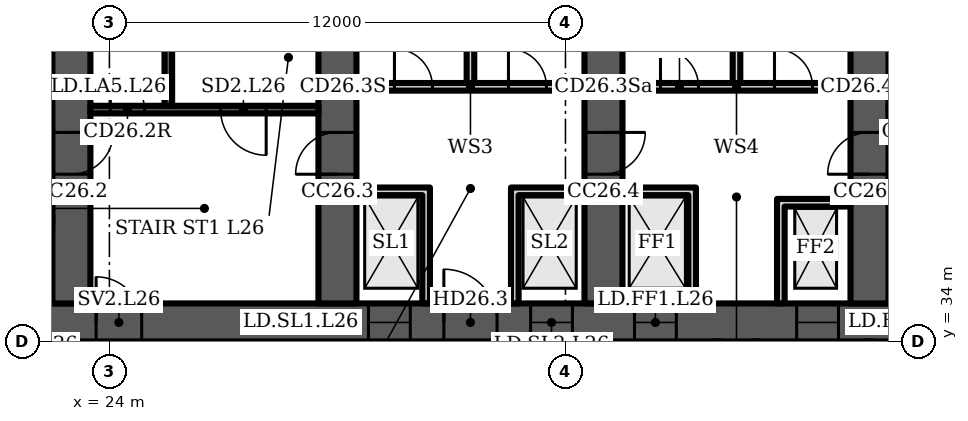
"""IFC4 building model, lengths in metres.
Left out: names, types, materials, properties, quantities, classifications, styles, units other than length and angle.
Written with IfcOpenShell. Run it as: python <this file> out.ifc"""

import sys

from ifc_helpers import new_model, si_unit, direction, frame, frame_2d, origin, place, context, subcontext, project, spatial, polyline, rectangle, outline, extrude, element, fill, save


model = new_model("IFC4")
c1 = context("Model", 3, precision=1e-05, world=origin(), true_north=direction((0.0, 1.0)))
c2 = subcontext(c1, "Body", "Model", "MODEL_VIEW")
j1 = project(units=[si_unit("LENGTHUNIT", "METRE"), si_unit("PLANEANGLEUNIT", "RADIAN")], contexts=[c1])
p1 = place(None, origin())
s1 = spatial("IfcSite", under=j1, at=p1, CompositionType="ELEMENT")
p2 = place(p1, origin())
s2 = spatial("IfcBuilding", under=s1, at=p2, CompositionType="ELEMENT")
p3 = place(p2, frame((0.0, 0.0, 114.7)))
s3 = spatial("IfcBuildingStorey", under=s2, at=p3, CompositionType="ELEMENT", Elevation=114.7)
p4 = place(p3, frame((16.0, 34.5, 0.0), z_axis=(0.0, 0.0, 1.0), x_axis=(1.0, 0.0, 0.0)))
e1 = element("IfcWall", 1, at=p4, inside=s3, PredefinedType="SHEAR", context=c2, shape_type="SweptSolid", body=[
    extrude(rectangle(XDim=49.0, YDim=1.0, at=frame_2d((24.5, 0.0))), origin(), (0.0, 0.0, 1.0), 3.6),
])
p5 = place(p4, frame((1.2, 0.0, 0.0)))
e2 = element("IfcOpeningElement", 2, at=p5, cuts=e1, PredefinedType="OPENING", context=c2, shape_type="SweptSolid", body=[
    extrude(rectangle(XDim=1.1, YDim=2.1, at=frame_2d((0.55, 1.05))), frame((0.0, 0.51, 0.0), z_axis=(0.0, -1.0, 0.0), x_axis=(1.0, 0.0, 0.0)), (0.0, 0.0, 1.0), 1.02),
])
p6 = place(p4, frame((5.083, 0.0, 0.0)))
e3 = element("IfcOpeningElement", 3, at=p6, cuts=e1, PredefinedType="OPENING", context=c2, shape_type="SweptSolid", body=[
    extrude(rectangle(XDim=1.1, YDim=2.1, at=frame_2d((0.55, 1.05))), frame((0.0, 0.51, 0.0), z_axis=(0.0, -1.0, 0.0), x_axis=(1.0, 0.0, 0.0)), (0.0, 0.0, 1.0), 1.02),
])
p7 = place(p4, frame((2.933, 0.0, 0.0)))
e4 = element("IfcOpeningElement", 4, at=p7, cuts=e1, PredefinedType="OPENING", context=c2, shape_type="SweptSolid", body=[
    extrude(rectangle(XDim=1.4, YDim=2.1, at=frame_2d((0.7, 1.05))), frame((0.0, 0.51, 0.0), z_axis=(0.0, -1.0, 0.0), x_axis=(1.0, 0.0, 0.0)), (0.0, 0.0, 1.0), 1.02),
])
p8 = place(p4, frame((7.65, 0.0, 0.0)))
e5 = element("IfcOpeningElement", 5, at=p8, cuts=e1, PredefinedType="OPENING", context=c2, shape_type="SweptSolid", body=[
    extrude(rectangle(XDim=1.2, YDim=2.1, at=frame_2d((0.6, 1.05))), frame((0.0, 0.51, 0.0), z_axis=(0.0, -1.0, 0.0), x_axis=(1.0, 0.0, 0.0)), (0.0, 0.0, 1.0), 1.02),
])
p9 = place(p4, frame((14.817, 0.0, 0.0)))
e6 = element("IfcOpeningElement", 6, at=p9, cuts=e1, PredefinedType="OPENING", context=c2, shape_type="SweptSolid", body=[
    extrude(rectangle(XDim=1.1, YDim=2.1, at=frame_2d((0.55, 1.05))), frame((0.0, 0.51, 0.0), z_axis=(0.0, -1.0, 0.0), x_axis=(1.0, 0.0, 0.0)), (0.0, 0.0, 1.0), 1.02),
])
p10 = place(p4, frame((19.083, 0.0, 0.0)))
e7 = element("IfcOpeningElement", 7, at=p10, cuts=e1, PredefinedType="OPENING", context=c2, shape_type="SweptSolid", body=[
    extrude(rectangle(XDim=1.1, YDim=2.1, at=frame_2d((0.55, 1.05))), frame((0.0, 0.51, 0.0), z_axis=(0.0, -1.0, 0.0), x_axis=(1.0, 0.0, 0.0)), (0.0, 0.0, 1.0), 1.02),
])
p11 = place(p4, frame((16.8, 0.0, 0.0)))
e8 = element("IfcOpeningElement", 8, at=p11, cuts=e1, PredefinedType="OPENING", context=c2, shape_type="SweptSolid", body=[
    extrude(rectangle(XDim=1.4, YDim=2.1, at=frame_2d((0.7, 1.05))), frame((0.0, 0.51, 0.0), z_axis=(0.0, -1.0, 0.0), x_axis=(1.0, 0.0, 0.0)), (0.0, 0.0, 1.0), 1.02),
])
p12 = place(p4, frame((21.817, 0.0, 0.0)))
e9 = element("IfcOpeningElement", 9, at=p12, cuts=e1, PredefinedType="OPENING", context=c2, shape_type="SweptSolid", body=[
    extrude(rectangle(XDim=1.1, YDim=2.1, at=frame_2d((0.55, 1.05))), frame((0.0, 0.51, 0.0), z_axis=(0.0, -1.0, 0.0), x_axis=(1.0, 0.0, 0.0)), (0.0, 0.0, 1.0), 1.02),
])
p13 = place(p4, frame((26.083, 0.0, 0.0)))
e10 = element("IfcOpeningElement", 10, at=p13, cuts=e1, PredefinedType="OPENING", context=c2, shape_type="SweptSolid", body=[
    extrude(rectangle(XDim=1.1, YDim=2.1, at=frame_2d((0.55, 1.05))), frame((0.0, 0.51, 0.0), z_axis=(0.0, -1.0, 0.0), x_axis=(1.0, 0.0, 0.0)), (0.0, 0.0, 1.0), 1.02),
])
p14 = place(p4, frame((33.15, 0.0, 0.0)))
e11 = element("IfcOpeningElement", 11, at=p14, cuts=e1, PredefinedType="OPENING", context=c2, shape_type="SweptSolid", body=[
    extrude(rectangle(XDim=1.2, YDim=2.1, at=frame_2d((0.6, 1.05))), frame((0.0, 0.51, 0.0), z_axis=(0.0, -1.0, 0.0), x_axis=(1.0, 0.0, 0.0)), (0.0, 0.0, 1.0), 1.02),
])
p15 = place(p4, frame((37.8, 0.0, 0.0)))
e12 = element("IfcOpeningElement", 12, at=p15, cuts=e1, PredefinedType="OPENING", context=c2, shape_type="SweptSolid", body=[
    extrude(rectangle(XDim=1.4, YDim=2.1, at=frame_2d((0.7, 1.05))), frame((0.0, 0.51, 0.0), z_axis=(0.0, -1.0, 0.0), x_axis=(1.0, 0.0, 0.0)), (0.0, 0.0, 1.0), 1.02),
])
p16 = place(p4, frame((42.817, 0.0, 0.0)))
e13 = element("IfcOpeningElement", 13, at=p16, cuts=e1, PredefinedType="OPENING", context=c2, shape_type="SweptSolid", body=[
    extrude(rectangle(XDim=1.1, YDim=2.1, at=frame_2d((0.55, 1.05))), frame((0.0, 0.51, 0.0), z_axis=(0.0, -1.0, 0.0), x_axis=(1.0, 0.0, 0.0)), (0.0, 0.0, 1.0), 1.02),
])
p17 = place(p4, frame((46.7, 0.0, 0.0)))
e14 = element("IfcOpeningElement", 14, at=p17, cuts=e1, PredefinedType="OPENING", context=c2, shape_type="SweptSolid", body=[
    extrude(rectangle(XDim=1.1, YDim=2.1, at=frame_2d((0.55, 1.05))), frame((0.0, 0.51, 0.0), z_axis=(0.0, -1.0, 0.0), x_axis=(1.0, 0.0, 0.0)), (0.0, 0.0, 1.0), 1.02),
])
p18 = place(p4, frame((44.667, 0.0, 0.0)))
e15 = element("IfcOpeningElement", 15, at=p18, cuts=e1, PredefinedType="OPENING", context=c2, shape_type="SweptSolid", body=[
    extrude(rectangle(XDim=1.4, YDim=2.1, at=frame_2d((0.7, 1.05))), frame((0.0, 0.51, 0.0), z_axis=(0.0, -1.0, 0.0), x_axis=(1.0, 0.0, 0.0)), (0.0, 0.0, 1.0), 1.02),
])
p19 = place(p3, frame((23.0, 35.0, 0.0), z_axis=(0.0, 0.0, 1.0), x_axis=(0.0, 1.0, 0.0)))
e16 = element("IfcWall", 16, at=p19, inside=s3, PredefinedType="SHEAR", context=c2, shape_type="SweptSolid", body=[
    extrude(rectangle(XDim=13.352, YDim=1.0, at=frame_2d((6.676, 0.0))), origin(), (0.0, 0.0, 1.0), 3.6),
])
p20 = place(p19, frame((10.426, 0.0, 0.0)))
e17 = element("IfcOpeningElement", 17, at=p20, cuts=e16, PredefinedType="OPENING", context=c2, shape_type="SweptSolid", body=[
    extrude(rectangle(XDim=1.0, YDim=2.1, at=frame_2d((0.5, 1.05))), frame((0.0, 0.51, 0.0), z_axis=(0.0, -1.0, 0.0), x_axis=(1.0, 0.0, 0.0)), (0.0, 0.0, 1.0), 1.02),
])
p21 = place(p19, frame((3.4, 0.0, 0.0)))
e18 = element("IfcOpeningElement", 18, at=p21, cuts=e16, PredefinedType="OPENING", context=c2, shape_type="SweptSolid", body=[
    extrude(rectangle(XDim=1.1, YDim=2.1, at=frame_2d((0.55, 1.05))), frame((0.0, 0.51, 0.0), z_axis=(0.0, -1.0, 0.0), x_axis=(1.0, 0.0, 0.0)), (0.0, 0.0, 1.0), 1.02),
])
p22 = place(p3, frame((30.0, 35.0, 0.0), z_axis=(0.0, 0.0, 1.0), x_axis=(0.0, 1.0, 0.0)))
e19 = element("IfcWall", 19, at=p22, inside=s3, PredefinedType="SHEAR", context=c2, shape_type="SweptSolid", body=[
    extrude(rectangle(XDim=13.965, YDim=1.0, at=frame_2d((6.982, 0.0))), origin(), (0.0, 0.0, 1.0), 3.6),
])
p23 = place(p22, frame((3.4, 0.0, 0.0)))
e20 = element("IfcOpeningElement", 20, at=p23, cuts=e19, PredefinedType="OPENING", context=c2, shape_type="SweptSolid", body=[
    extrude(rectangle(XDim=1.1, YDim=2.1, at=frame_2d((0.55, 1.05))), frame((0.0, 0.51, 0.0), z_axis=(0.0, -1.0, 0.0), x_axis=(1.0, 0.0, 0.0)), (0.0, 0.0, 1.0), 1.02),
])
p24 = place(p3, frame((37.0, 35.0, 0.0), z_axis=(0.0, 0.0, 1.0), x_axis=(0.0, 1.0, 0.0)))
e21 = element("IfcWall", 21, at=p24, inside=s3, PredefinedType="SHEAR", context=c2, shape_type="SweptSolid", body=[
    extrude(rectangle(XDim=14.577, YDim=1.0, at=frame_2d((7.289, 0.0))), origin(), (0.0, 0.0, 1.0), 3.6),
])
p25 = place(p24, frame((3.4, 0.0, 0.0)))
e22 = element("IfcOpeningElement", 22, at=p25, cuts=e21, PredefinedType="OPENING", context=c2, shape_type="SweptSolid", body=[
    extrude(rectangle(XDim=1.1, YDim=2.1, at=frame_2d((0.55, 1.05))), frame((0.0, 0.51, 0.0), z_axis=(0.0, -1.0, 0.0), x_axis=(1.0, 0.0, 0.0)), (0.0, 0.0, 1.0), 1.02),
])
p26 = place(p24, frame((9.8, 0.0, 0.0)))
e23 = element("IfcOpeningElement", 23, at=p26, cuts=e21, PredefinedType="OPENING", context=c2, shape_type="SweptSolid", body=[
    extrude(rectangle(XDim=1.0, YDim=2.1, at=frame_2d((0.5, 1.05))), frame((0.0, 0.51, 0.0), z_axis=(0.0, -1.0, 0.0), x_axis=(1.0, 0.0, 0.0)), (0.0, 0.0, 1.0), 1.02),
])
p27 = place(p3, frame((44.0, 35.0, 0.0), z_axis=(0.0, 0.0, 1.0), x_axis=(0.0, 1.0, 0.0)))
e24 = element("IfcWall", 24, at=p27, inside=s3, PredefinedType="SHEAR", context=c2, shape_type="SweptSolid", body=[
    extrude(rectangle(XDim=14.577, YDim=1.0, at=frame_2d((7.289, 0.0))), origin(), (0.0, 0.0, 1.0), 3.6),
])
p28 = place(p27, frame((3.4, 0.0, 0.0)))
e25 = element("IfcOpeningElement", 25, at=p28, cuts=e24, PredefinedType="OPENING", context=c2, shape_type="SweptSolid", body=[
    extrude(rectangle(XDim=1.1, YDim=2.1, at=frame_2d((0.55, 1.05))), frame((0.0, 0.51, 0.0), z_axis=(0.0, -1.0, 0.0), x_axis=(1.0, 0.0, 0.0)), (0.0, 0.0, 1.0), 1.02),
])
p29 = place(p27, frame((9.8, 0.0, 0.0)))
e26 = element("IfcOpeningElement", 26, at=p29, cuts=e24, PredefinedType="OPENING", context=c2, shape_type="SweptSolid", body=[
    extrude(rectangle(XDim=1.0, YDim=2.1, at=frame_2d((0.5, 1.05))), frame((0.0, 0.51, 0.0), z_axis=(0.0, -1.0, 0.0), x_axis=(1.0, 0.0, 0.0)), (0.0, 0.0, 1.0), 1.02),
])
p30 = place(p3, frame((23.5, 40.1, 0.0), z_axis=(0.0, 0.0, 1.0), x_axis=(1.0, 0.0, 0.0)))
e27 = element("IfcWall", 27, at=p30, inside=s3, PredefinedType="SHEAR", context=c2, shape_type="SweptSolid", body=[
    extrude(rectangle(XDim=6.0, YDim=0.2, at=frame_2d((3.0, 0.0))), origin(), (0.0, 0.0, 1.0), 3.2),
])
p31 = place(p30, frame((3.425, 0.0, 0.0)))
e28 = element("IfcOpeningElement", 28, at=p31, cuts=e27, PredefinedType="OPENING", context=c2, shape_type="SweptSolid", body=[
    extrude(rectangle(XDim=1.2, YDim=2.1, at=frame_2d((0.6, 1.05))), frame((0.0, 0.11, 0.0), z_axis=(0.0, -1.0, 0.0), x_axis=(1.0, 0.0, 0.0)), (0.0, 0.0, 1.0), 0.22),
])
p32 = place(p30, frame((0.525, 0.0, 0.0)))
e29 = element("IfcOpeningElement", 29, at=p32, cuts=e27, PredefinedType="OPENING", context=c2, shape_type="SweptSolid", body=[
    extrude(rectangle(XDim=0.9, YDim=2.1, at=frame_2d((0.45, 1.05))), frame((0.0, 0.11, 0.0), z_axis=(0.0, -1.0, 0.0), x_axis=(1.0, 0.0, 0.0)), (0.0, 0.0, 1.0), 0.22),
])
p33 = place(p3, frame((25.55, 40.2, 0.0), z_axis=(0.0, 0.0, 1.0), x_axis=(0.0, 1.0, 0.0)))
e30 = element("IfcWall", 30, at=p33, inside=s3, PredefinedType="SHEAR", context=c2, shape_type="SweptSolid", body=[
    extrude(rectangle(XDim=7.2, YDim=0.2, at=frame_2d((3.6, 0.0))), origin(), (0.0, 0.0, 1.0), 3.2),
])
p34 = place(p3, frame((30.5, 40.7, 0.0), z_axis=(0.0, 0.0, 1.0), x_axis=(1.0, 0.0, 0.0)))
e31 = element("IfcWall", 31, at=p34, inside=s3, PredefinedType="PARTITIONING", context=c2, shape_type="SweptSolid", body=[
    extrude(rectangle(XDim=6.0, YDim=0.2, at=frame_2d((3.0, 0.0))), origin(), (0.0, 0.0, 1.0), 3.2),
])
p35 = place(p34, frame((1.0, 0.0, 0.0)))
e32 = element("IfcOpeningElement", 32, at=p35, cuts=e31, PredefinedType="OPENING", context=c2, shape_type="SweptSolid", body=[
    extrude(rectangle(XDim=1.0, YDim=2.1, at=frame_2d((0.5, 1.05))), frame((0.0, 0.11, 0.0), z_axis=(0.0, -1.0, 0.0), x_axis=(1.0, 0.0, 0.0)), (0.0, 0.0, 1.0), 0.22),
])
p36 = place(p34, frame((4.0, 0.0, 0.0)))
e33 = element("IfcOpeningElement", 33, at=p36, cuts=e31, PredefinedType="OPENING", context=c2, shape_type="SweptSolid", body=[
    extrude(rectangle(XDim=1.0, YDim=2.1, at=frame_2d((0.5, 1.05))), frame((0.0, 0.11, 0.0), z_axis=(0.0, -1.0, 0.0), x_axis=(1.0, 0.0, 0.0)), (0.0, 0.0, 1.0), 0.22),
])
p37 = place(p3, frame((0.0, 0.0, -0.0)))
e34 = element("IfcWall", 34, at=p37, inside=s3, PredefinedType="PARTITIONING", context=c2, shape_type="SweptSolid", body=[
    extrude(outline(polyline([(32.233, 37.85), (30.5, 37.85), (30.5, 38.05), (32.233, 38.05), (32.433, 38.05), (32.433, 35.0), (32.233, 35.0), (32.233, 37.85)])), origin(), (0.0, 0.0, 1.0), 3.2),
])
p38 = place(p3, frame((0.0, 0.0, -0.0)))
e35 = element("IfcWall", 35, at=p38, inside=s3, PredefinedType="PARTITIONING", context=c2, shape_type="SweptSolid", body=[
    extrude(outline(polyline([(34.567, 38.05), (34.767, 38.05), (36.5, 38.05), (36.5, 37.85), (34.767, 37.85), (34.767, 35.0), (34.567, 35.0), (34.567, 38.05)])), origin(), (0.0, 0.0, 1.0), 3.2),
])
p39 = place(p3, frame((33.5, 40.8, 0.0), z_axis=(0.0, 0.0, 1.0), x_axis=(0.0, 1.0, 0.0)))
e36 = element("IfcWall", 36, at=p39, inside=s3, PredefinedType="PARTITIONING", context=c2, shape_type="SweptSolid", body=[
    extrude(rectangle(XDim=8.232, YDim=0.2, at=frame_2d((4.116, 0.0))), origin(), (0.0, 0.0, 1.0), 3.2),
])
p40 = place(p3, frame((37.5, 40.7, 0.0), z_axis=(0.0, 0.0, 1.0), x_axis=(1.0, 0.0, 0.0)))
e37 = element("IfcWall", 37, at=p40, inside=s3, PredefinedType="PARTITIONING", context=c2, shape_type="SweptSolid", body=[
    extrude(rectangle(XDim=6.0, YDim=0.2, at=frame_2d((3.0, 0.0))), origin(), (0.0, 0.0, 1.0), 3.2),
])
p41 = place(p40, frame((1.0, 0.0, 0.0)))
e38 = element("IfcOpeningElement", 38, at=p41, cuts=e37, PredefinedType="OPENING", context=c2, shape_type="SweptSolid", body=[
    extrude(rectangle(XDim=1.0, YDim=2.1, at=frame_2d((0.5, 1.05))), frame((0.0, 0.11, 0.0), z_axis=(0.0, -1.0, 0.0), x_axis=(1.0, 0.0, 0.0)), (0.0, 0.0, 1.0), 0.22),
])
p42 = place(p40, frame((4.0, 0.0, 0.0)))
e39 = element("IfcOpeningElement", 39, at=p42, cuts=e37, PredefinedType="OPENING", context=c2, shape_type="SweptSolid", body=[
    extrude(rectangle(XDim=1.0, YDim=2.1, at=frame_2d((0.5, 1.05))), frame((0.0, 0.11, 0.0), z_axis=(0.0, -1.0, 0.0), x_axis=(1.0, 0.0, 0.0)), (0.0, 0.0, 1.0), 0.22),
])
p43 = place(p3, frame((0.0, 0.0, -0.0)))
e40 = element("IfcWall", 40, at=p43, inside=s3, PredefinedType="PARTITIONING", context=c2, shape_type="SweptSolid", body=[
    extrude(outline(polyline([(41.567, 37.75), (41.767, 37.75), (43.5, 37.75), (43.5, 37.55), (41.767, 37.55), (41.767, 35.0), (41.567, 35.0), (41.567, 37.75)])), origin(), (0.0, 0.0, 1.0), 3.2),
])
p44 = place(p3, frame((0.0, 0.0, -0.0)))
e41 = element("IfcWall", 41, at=p44, inside=s3, PredefinedType="PARTITIONING", context=c2, shape_type="SweptSolid", body=[
    extrude(outline(polyline([(39.233, 37.85), (37.5, 37.85), (37.5, 38.05), (39.233, 38.05), (39.433, 38.05), (39.433, 35.0), (39.233, 35.0), (39.233, 37.85)])), origin(), (0.0, 0.0, 1.0), 3.2),
])
p45 = place(p3, frame((40.5, 40.8, 0.0), z_axis=(0.0, 0.0, 1.0), x_axis=(0.0, 1.0, 0.0)))
e42 = element("IfcWall", 42, at=p45, inside=s3, PredefinedType="PARTITIONING", context=c2, shape_type="SweptSolid", body=[
    extrude(rectangle(XDim=8.844, YDim=0.2, at=frame_2d((4.422, 0.0))), origin(), (0.0, 0.0, 1.0), 3.2),
])
p46 = place(p31, origin())
e43 = element("IfcDoor", 43, at=p46, inside=s3, OperationType="SINGLE_SWING_RIGHT", PredefinedType="DOOR", context=c2, shape_type="SweptSolid", body=[
    extrude(rectangle(XDim=1.2, YDim=2.1, at=frame_2d((0.6, 1.05))), frame((0.0, 0.025, 0.0), z_axis=(0.0, -1.0, 0.0), x_axis=(1.0, 0.0, 0.0)), (0.0, 0.0, 1.0), 0.05),
])
fill(e28, e43)
p47 = place(p32, origin())
e44 = element("IfcDoor", 44, at=p47, inside=s3, OperationType="SINGLE_SWING_LEFT", PredefinedType="DOOR", context=c2, shape_type="SweptSolid", body=[
    extrude(rectangle(XDim=0.9, YDim=2.1, at=frame_2d((0.45, 1.05))), frame((0.0, 0.025, 0.0), z_axis=(0.0, -1.0, 0.0), x_axis=(1.0, 0.0, 0.0)), (0.0, 0.0, 1.0), 0.05),
])
fill(e29, e44)
p48 = place(p8, origin())
e45 = element("IfcDoor", 45, at=p48, inside=s3, OperationType="SINGLE_SWING_LEFT", PredefinedType="DOOR", context=c2, shape_type="SweptSolid", body=[
    extrude(rectangle(XDim=1.2, YDim=2.1, at=frame_2d((0.6, 1.05))), frame((0.0, 0.025, 0.0), z_axis=(0.0, -1.0, 0.0), x_axis=(1.0, 0.0, 0.0)), (0.0, 0.0, 1.0), 0.05),
])
fill(e5, e45)
p49 = place(p9, origin())
e46 = element("IfcDoor", 46, at=p49, inside=s3, OperationType="DOUBLE_DOOR_SLIDING", PredefinedType="DOOR", context=c2, shape_type="SweptSolid", body=[
    extrude(rectangle(XDim=1.1, YDim=2.1, at=frame_2d((0.55, 1.05))), frame((0.0, 0.025, 0.0), z_axis=(0.0, -1.0, 0.0), x_axis=(1.0, 0.0, 0.0)), (0.0, 0.0, 1.0), 0.05),
])
fill(e6, e46)
p50 = place(p10, origin())
e47 = element("IfcDoor", 47, at=p50, inside=s3, OperationType="DOUBLE_DOOR_SLIDING", PredefinedType="DOOR", context=c2, shape_type="SweptSolid", body=[
    extrude(rectangle(XDim=1.1, YDim=2.1, at=frame_2d((0.55, 1.05))), frame((0.0, 0.025, 0.0), z_axis=(0.0, -1.0, 0.0), x_axis=(1.0, 0.0, 0.0)), (0.0, 0.0, 1.0), 0.05),
])
fill(e7, e47)
p51 = place(p11, origin())
e48 = element("IfcDoor", 48, at=p51, inside=s3, OperationType="DOUBLE_DOOR_SINGLE_SWING", PredefinedType="DOOR", context=c2, shape_type="SweptSolid", body=[
    extrude(rectangle(XDim=1.4, YDim=2.1, at=frame_2d((0.7, 1.05))), frame((0.0, 0.025, 0.0), z_axis=(0.0, -1.0, 0.0), x_axis=(1.0, 0.0, 0.0)), (0.0, 0.0, 1.0), 0.05),
])
fill(e8, e48)
p52 = place(p35, origin())
e49 = element("IfcDoor", 49, at=p52, inside=s3, OperationType="SINGLE_SWING_LEFT", PredefinedType="DOOR", context=c2, shape_type="SweptSolid", body=[
    extrude(rectangle(XDim=1.0, YDim=2.1, at=frame_2d((0.5, 1.05))), frame((0.0, 0.025, 0.0), z_axis=(0.0, -1.0, 0.0), x_axis=(1.0, 0.0, 0.0)), (0.0, 0.0, 1.0), 0.05),
])
fill(e32, e49)
p53 = place(p36, origin())
e50 = element("IfcDoor", 50, at=p53, inside=s3, OperationType="SINGLE_SWING_LEFT", PredefinedType="DOOR", context=c2, shape_type="SweptSolid", body=[
    extrude(rectangle(XDim=1.0, YDim=2.1, at=frame_2d((0.5, 1.05))), frame((0.0, 0.025, 0.0), z_axis=(0.0, -1.0, 0.0), x_axis=(1.0, 0.0, 0.0)), (0.0, 0.0, 1.0), 0.05),
])
fill(e33, e50)
p54 = place(p12, origin())
e51 = element("IfcDoor", 51, at=p54, inside=s3, OperationType="DOUBLE_DOOR_SLIDING", PredefinedType="DOOR", context=c2, shape_type="SweptSolid", body=[
    extrude(rectangle(XDim=1.1, YDim=2.1, at=frame_2d((0.55, 1.05))), frame((0.0, 0.025, 0.0), z_axis=(0.0, -1.0, 0.0), x_axis=(1.0, 0.0, 0.0)), (0.0, 0.0, 1.0), 0.05),
])
fill(e9, e51)
p55 = place(p13, origin())
e52 = element("IfcDoor", 52, at=p55, inside=s3, OperationType="DOUBLE_DOOR_SLIDING", PredefinedType="DOOR", context=c2, shape_type="SweptSolid", body=[
    extrude(rectangle(XDim=1.1, YDim=2.1, at=frame_2d((0.55, 1.05))), frame((0.0, 0.025, 0.0), z_axis=(0.0, -1.0, 0.0), x_axis=(1.0, 0.0, 0.0)), (0.0, 0.0, 1.0), 0.05),
])
fill(e10, e52)
p56 = place(p41, origin())
e53 = element("IfcDoor", 53, at=p56, inside=s3, OperationType="SINGLE_SWING_LEFT", PredefinedType="DOOR", context=c2, shape_type="SweptSolid", body=[
    extrude(rectangle(XDim=1.0, YDim=2.1, at=frame_2d((0.5, 1.05))), frame((0.0, 0.025, 0.0), z_axis=(0.0, -1.0, 0.0), x_axis=(1.0, 0.0, 0.0)), (0.0, 0.0, 1.0), 0.05),
])
fill(e38, e53)
p57 = place(p42, origin())
e54 = element("IfcDoor", 54, at=p57, inside=s3, OperationType="SINGLE_SWING_LEFT", PredefinedType="DOOR", context=c2, shape_type="SweptSolid", body=[
    extrude(rectangle(XDim=1.0, YDim=2.1, at=frame_2d((0.5, 1.05))), frame((0.0, 0.025, 0.0), z_axis=(0.0, -1.0, 0.0), x_axis=(1.0, 0.0, 0.0)), (0.0, 0.0, 1.0), 0.05),
])
fill(e39, e54)
p58 = place(p21, origin())
e55 = element("IfcDoor", 55, at=p58, inside=s3, OperationType="SINGLE_SWING_RIGHT", PredefinedType="DOOR", context=c2, shape_type="SweptSolid", body=[
    extrude(rectangle(XDim=1.1, YDim=2.1, at=frame_2d((0.55, 1.05))), frame((0.0, 0.025, 0.0), z_axis=(0.0, -1.0, 0.0), x_axis=(1.0, 0.0, 0.0)), (0.0, 0.0, 1.0), 0.05),
])
fill(e18, e55)
p59 = place(p23, origin())
e56 = element("IfcDoor", 56, at=p59, inside=s3, OperationType="SINGLE_SWING_LEFT", PredefinedType="DOOR", context=c2, shape_type="SweptSolid", body=[
    extrude(rectangle(XDim=1.1, YDim=2.1, at=frame_2d((0.55, 1.05))), frame((0.0, 0.025, 0.0), z_axis=(0.0, -1.0, 0.0), x_axis=(1.0, 0.0, 0.0)), (0.0, 0.0, 1.0), 0.05),
])
fill(e20, e56)
p60 = place(p25, origin())
e57 = element("IfcDoor", 57, at=p60, inside=s3, OperationType="SINGLE_SWING_RIGHT", PredefinedType="DOOR", context=c2, shape_type="SweptSolid", body=[
    extrude(rectangle(XDim=1.1, YDim=2.1, at=frame_2d((0.55, 1.05))), frame((0.0, 0.025, 0.0), z_axis=(0.0, -1.0, 0.0), x_axis=(1.0, 0.0, 0.0)), (0.0, 0.0, 1.0), 0.05),
])
fill(e22, e57)
p61 = place(p28, origin())
e58 = element("IfcDoor", 58, at=p61, inside=s3, OperationType="SINGLE_SWING_LEFT", PredefinedType="DOOR", context=c2, shape_type="SweptSolid", body=[
    extrude(rectangle(XDim=1.1, YDim=2.1, at=frame_2d((0.55, 1.05))), frame((0.0, 0.025, 0.0), z_axis=(0.0, -1.0, 0.0), x_axis=(1.0, 0.0, 0.0)), (0.0, 0.0, 1.0), 0.05),
])
fill(e25, e58)
save(model, sys.argv[1])
